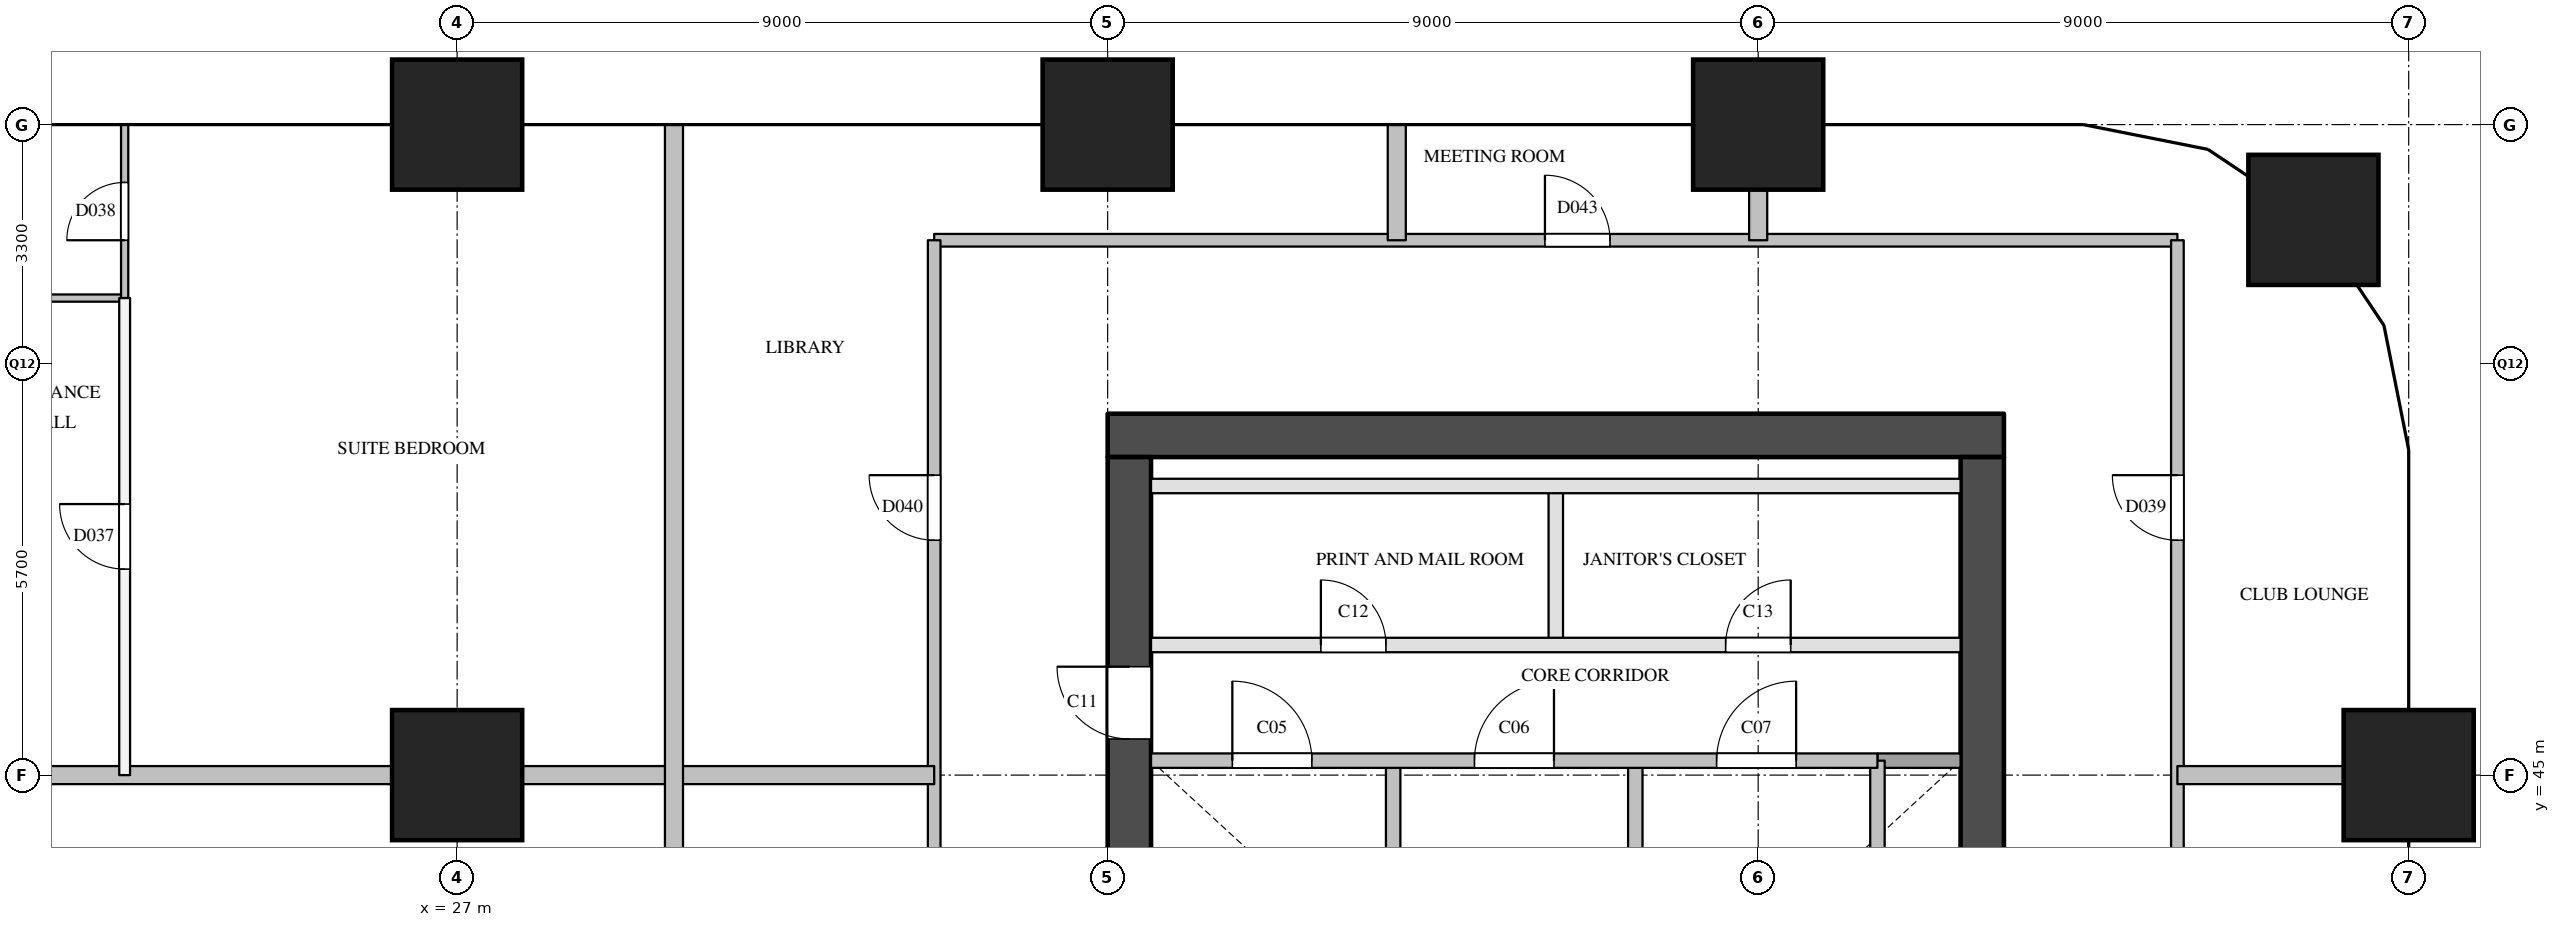
"""IFC4 building model, lengths in metres.
Left out: names, types, materials, properties, quantities, classifications, styles, units other than length and angle.
Written with IfcOpenShell. Run it as: python <this file> out.ifc"""

import sys

from ifc_helpers import new_model, si_unit, direction, frame, frame_2d, origin, origin_2d, place, context, subcontext, project, spatial, rectangle, extrude, element, fill, save


model = new_model("IFC4")
c1 = context("Model", 3, precision=1e-05, world=origin(), true_north=direction((0.0, 1.0)))
c2 = subcontext(c1, "Body", "Model", "MODEL_VIEW")
j1 = project(units=[si_unit("LENGTHUNIT", "METRE"), si_unit("PLANEANGLEUNIT", "RADIAN")], contexts=[c1])
p1 = place(None, origin())
s1 = spatial("IfcSite", under=j1, at=p1, CompositionType="ELEMENT")
p2 = place(p1, origin())
s2 = spatial("IfcBuilding", under=s1, at=p2, CompositionType="ELEMENT")
p3 = place(p2, frame((0.0, 0.0, 50.0)))
s3 = spatial("IfcBuildingStorey", under=s2, at=p3, CompositionType="ELEMENT", Elevation=50.0)
for number, where, z_axis, x_axis in (
    (1, (27.0, 45.0, 0.0), (0.0, 0.0, 1.0), (1.0, 0.0, 0.0)),
    (2, (27.0, 54.0, 0.0), (0.0, 0.0, 1.0), (1.0, 0.0, 0.0)),
    (3, (36.0, 54.0, 0.0), (0.0, 0.0, 1.0), (1.0, 0.0, 0.0)),
    (4, (45.0, 54.0, 0.0), (0.0, 0.0, 1.0), (1.0, 0.0, 0.0)),
    (5, (54.0, 45.0, 0.0), (0.0, 0.0, 1.0), (1.0, 0.0, 0.0)),
    (6, (52.682, 52.682, 0.0), (0.0, 0.0, 1.0), (1.0, 0.0, 0.0)),
):
    element("IfcColumn", number, at=place(p3, frame(where, z_axis=z_axis, x_axis=x_axis)), inside=s3, PredefinedType="COLUMN", context=c2, shape_type="SweptSolid", body=[
        extrude(rectangle(XDim=1.8, YDim=1.8, at=origin_2d()), origin(), (0.0, 0.0, 1.0), 3.8),
    ])
p4 = place(p3, frame((36.0, 49.7, 0.0), z_axis=(0.0, 0.0, 1.0), x_axis=(1.0, 0.0, 0.0)))
e7 = element("IfcWall", 7, at=p4, inside=s3, PredefinedType="SHEAR", context=c2, shape_type="SweptSolid", body=[
    extrude(rectangle(XDim=12.4, YDim=0.6, at=frame_2d((6.2, 0.0))), origin(), (0.0, 0.0, 1.0), 3.5),
])
p5 = place(p3, frame((36.3, 29.1, 0.0), z_axis=(0.0, 0.0, 1.0), x_axis=(0.0, 1.0, 0.0)))
e8 = element("IfcWall", 8, at=p5, inside=s3, PredefinedType="SHEAR", context=c2, shape_type="SweptSolid", body=[
    extrude(rectangle(XDim=20.3, YDim=0.6, at=frame_2d((10.15, 0.0))), origin(), (0.0, 0.0, 1.0), 3.5),
])
p6 = place(p5, frame((3.6, 0.0, 0.0)))
e9 = element("IfcOpeningElement", 9, at=p6, cuts=e8, PredefinedType="OPENING", context=c2, shape_type="SweptSolid", body=[
    extrude(rectangle(XDim=1.8, YDim=2.1, at=frame_2d((0.9, 1.05))), frame((0.0, 0.31, 0.0), z_axis=(0.0, -1.0, 0.0), x_axis=(1.0, 0.0, 0.0)), (0.0, 0.0, 1.0), 0.62),
])
p7 = place(p5, frame((16.4, 0.0, 0.0)))
e10 = element("IfcOpeningElement", 10, at=p7, cuts=e8, PredefinedType="OPENING", context=c2, shape_type="SweptSolid", body=[
    extrude(rectangle(XDim=1.0, YDim=2.1, at=frame_2d((0.5, 1.05))), frame((0.0, 0.31, 0.0), z_axis=(0.0, -1.0, 0.0), x_axis=(1.0, 0.0, 0.0)), (0.0, 0.0, 1.0), 0.62),
])
p8 = place(p3, frame((48.1, 29.1, 0.0), z_axis=(0.0, 0.0, 1.0), x_axis=(0.0, 1.0, 0.0)))
e11 = element("IfcWall", 11, at=p8, inside=s3, PredefinedType="SHEAR", context=c2, shape_type="SweptSolid", body=[
    extrude(rectangle(XDim=20.3, YDim=0.6, at=frame_2d((10.15, 0.0))), origin(), (0.0, 0.0, 1.0), 3.5),
])
p9 = place(p8, frame((12.5, 0.0, 0.0)))
e12 = element("IfcOpeningElement", 12, at=p9, cuts=e11, PredefinedType="OPENING", context=c2, shape_type="SweptSolid", body=[
    extrude(rectangle(XDim=0.7, YDim=2.1, at=frame_2d((0.35, 1.05))), frame((0.0, 0.31, 0.0), z_axis=(0.0, -1.0, 0.0), x_axis=(1.0, 0.0, 0.0)), (0.0, 0.0, 1.0), 0.62),
])
p10 = place(p8, frame((3.9, 0.0, 0.0)))
e13 = element("IfcOpeningElement", 13, at=p10, cuts=e11, PredefinedType="OPENING", context=c2, shape_type="SweptSolid", body=[
    extrude(rectangle(XDim=1.8, YDim=2.1, at=frame_2d((0.9, 1.05))), frame((0.0, 0.31, 0.0), z_axis=(0.0, -1.0, 0.0), x_axis=(1.0, 0.0, 0.0)), (0.0, 0.0, 1.0), 0.62),
])
p11 = place(p3, frame((39.95, 40.78, 0.0), z_axis=(0.0, 0.0, 1.0), x_axis=(0.0, 1.0, 0.0)))
e14 = element("IfcWall", 14, at=p11, inside=s3, PredefinedType="SOLIDWALL", context=c2, shape_type="SweptSolid", body=[
    extrude(rectangle(XDim=4.42, YDim=0.2, at=frame_2d((2.21, 0.0))), origin(), (0.0, 0.0, 1.0), 3.5),
])
p12 = place(p3, frame((42.2, 46.8, 0.0), z_axis=(0.0, 0.0, 1.0), x_axis=(0.0, 1.0, 0.0)))
e15 = element("IfcWall", 15, at=p12, inside=s3, PredefinedType="PARTITIONING", context=c2, shape_type="SweptSolid", body=[
    extrude(rectangle(XDim=2.2, YDim=0.2, at=frame_2d((1.1, 0.0))), origin(), (0.0, 0.0, 1.0), 3.5),
])
for number, where, z_axis, x_axis in (
    (16, (43.3, 40.78, 0.0), (0.0, 0.0, 1.0), (0.0, 1.0, 0.0)),
    (17, (46.65, 40.78, 0.0), (0.0, 0.0, 1.0), (0.0, 1.0, 0.0)),
):
    element("IfcWall", number, at=place(p3, frame(where, z_axis=z_axis, x_axis=x_axis)), inside=s3, PredefinedType="SOLIDWALL", context=c2, shape_type="SweptSolid", body=[
        extrude(rectangle(XDim=4.42, YDim=0.2, at=frame_2d((2.21, 0.0))), origin(), (0.0, 0.0, 1.0), 3.5),
    ])
p13 = place(p3, frame((46.65, 45.2, 0.0), z_axis=(0.0, 0.0, 1.0), x_axis=(1.0, 0.0, 0.0)))
e18 = element("IfcWall", 18, at=p13, inside=s3, PredefinedType="SOLIDWALL", context=c2, shape_type="SweptSolid", body=[
    extrude(rectangle(XDim=1.15, YDim=0.2, at=frame_2d((0.575, 0.0))), origin(), (0.0, 0.0, 1.0), 3.5),
])
p14 = place(p3, frame((36.6, 45.2, 0.0), z_axis=(0.0, 0.0, 1.0), x_axis=(1.0, 0.0, 0.0)))
e19 = element("IfcWall", 19, at=p14, inside=s3, PredefinedType="SOLIDWALL", context=c2, shape_type="SweptSolid", body=[
    extrude(rectangle(XDim=10.05, YDim=0.2, at=frame_2d((5.025, 0.0))), origin(), (0.0, 0.0, 1.0), 3.5),
])
p15 = place(p14, frame((1.125, 0.0, 0.0)))
e20 = element("IfcOpeningElement", 20, at=p15, cuts=e19, PredefinedType="OPENING", context=c2, shape_type="SweptSolid", body=[
    extrude(rectangle(XDim=1.1, YDim=2.1, at=frame_2d((0.55, 1.05))), frame((0.0, 0.11, 0.0), z_axis=(0.0, -1.0, 0.0), x_axis=(1.0, 0.0, 0.0)), (0.0, 0.0, 1.0), 0.22),
])
p16 = place(p14, frame((4.475, 0.0, 0.0)))
e21 = element("IfcOpeningElement", 21, at=p16, cuts=e19, PredefinedType="OPENING", context=c2, shape_type="SweptSolid", body=[
    extrude(rectangle(XDim=1.1, YDim=2.1, at=frame_2d((0.55, 1.05))), frame((0.0, 0.11, 0.0), z_axis=(0.0, -1.0, 0.0), x_axis=(1.0, 0.0, 0.0)), (0.0, 0.0, 1.0), 0.22),
])
p17 = place(p14, frame((7.825, 0.0, 0.0)))
e22 = element("IfcOpeningElement", 22, at=p17, cuts=e19, PredefinedType="OPENING", context=c2, shape_type="SweptSolid", body=[
    extrude(rectangle(XDim=1.1, YDim=2.1, at=frame_2d((0.55, 1.05))), frame((0.0, 0.11, 0.0), z_axis=(0.0, -1.0, 0.0), x_axis=(1.0, 0.0, 0.0)), (0.0, 0.0, 1.0), 0.22),
])
p18 = place(p3, frame((36.6, 46.8, 0.0), z_axis=(0.0, 0.0, 1.0), x_axis=(1.0, 0.0, 0.0)))
e23 = element("IfcWall", 23, at=p18, inside=s3, PredefinedType="PARTITIONING", context=c2, shape_type="SweptSolid", body=[
    extrude(rectangle(XDim=11.2, YDim=0.2, at=frame_2d((5.6, 0.0))), origin(), (0.0, 0.0, 1.0), 3.5),
])
p19 = place(p18, frame((2.35, 0.0, 0.0)))
e24 = element("IfcOpeningElement", 24, at=p19, cuts=e23, PredefinedType="OPENING", context=c2, shape_type="SweptSolid", body=[
    extrude(rectangle(XDim=0.9, YDim=2.1, at=frame_2d((0.45, 1.05))), frame((0.0, 0.11, 0.0), z_axis=(0.0, -1.0, 0.0), x_axis=(1.0, 0.0, 0.0)), (0.0, 0.0, 1.0), 0.22),
])
p20 = place(p18, frame((7.95, 0.0, 0.0)))
e25 = element("IfcOpeningElement", 25, at=p20, cuts=e23, PredefinedType="OPENING", context=c2, shape_type="SweptSolid", body=[
    extrude(rectangle(XDim=0.9, YDim=2.1, at=frame_2d((0.45, 1.05))), frame((0.0, 0.11, 0.0), z_axis=(0.0, -1.0, 0.0), x_axis=(1.0, 0.0, 0.0)), (0.0, 0.0, 1.0), 0.22),
])
p21 = place(p3, frame((36.6, 49.0, 0.0), z_axis=(0.0, 0.0, 1.0), x_axis=(1.0, 0.0, 0.0)))
e26 = element("IfcWall", 26, at=p21, inside=s3, PredefinedType="PARTITIONING", context=c2, shape_type="SweptSolid", body=[
    extrude(rectangle(XDim=11.2, YDim=0.2, at=frame_2d((5.6, 0.0))), origin(), (0.0, 0.0, 1.0), 3.5),
])
p22 = place(p3, frame((33.6, 52.4, 0.0), z_axis=(0.0, 0.0, 1.0), x_axis=(1.0, 0.0, 0.0)))
e27 = element("IfcWall", 27, at=p22, inside=s3, PredefinedType="PARTITIONING", context=c2, shape_type="SweptSolid", body=[
    extrude(rectangle(XDim=17.2, YDim=0.175, at=frame_2d((8.6, 0.0))), origin(), (0.0, 0.0, 1.0), 3.5),
])
p23 = place(p22, frame((8.45, 0.0, 0.0)))
e28 = element("IfcOpeningElement", 28, at=p23, cuts=e27, PredefinedType="OPENING", context=c2, shape_type="SweptSolid", body=[
    extrude(rectangle(XDim=0.9, YDim=2.1, at=frame_2d((0.45, 1.05))), frame((0.0, 0.097, 0.0), z_axis=(0.0, -1.0, 0.0), x_axis=(1.0, 0.0, 0.0)), (0.0, 0.0, 1.0), 0.195),
])
p24 = place(p3, frame((33.6, 41.2, 0.0), z_axis=(0.0, 0.0, 1.0), x_axis=(0.0, 1.0, 0.0)))
e29 = element("IfcWall", 29, at=p24, inside=s3, PredefinedType="PARTITIONING", context=c2, shape_type="SweptSolid", body=[
    extrude(rectangle(XDim=11.2, YDim=0.175, at=frame_2d((5.6, 0.0))), origin(), (0.0, 0.0, 1.0), 3.5),
])
p25 = place(p24, frame((1.4, 0.0, 0.0)))
e30 = element("IfcOpeningElement", 30, at=p25, cuts=e29, PredefinedType="OPENING", context=c2, shape_type="SweptSolid", body=[
    extrude(rectangle(XDim=1.0, YDim=2.1, at=frame_2d((0.5, 1.05))), frame((0.0, 0.097, 0.0), z_axis=(0.0, -1.0, 0.0), x_axis=(1.0, 0.0, 0.0)), (0.0, 0.0, 1.0), 0.195),
])
p26 = place(p24, frame((7.05, 0.0, 0.0)))
e31 = element("IfcOpeningElement", 31, at=p26, cuts=e29, PredefinedType="OPENING", context=c2, shape_type="SweptSolid", body=[
    extrude(rectangle(XDim=0.9, YDim=2.1, at=frame_2d((0.45, 1.05))), frame((0.0, 0.097, 0.0), z_axis=(0.0, -1.0, 0.0), x_axis=(1.0, 0.0, 0.0)), (0.0, 0.0, 1.0), 0.195),
])
p27 = place(p3, frame((50.8, 26.1, 0.0), z_axis=(0.0, 0.0, 1.0), x_axis=(0.0, 1.0, 0.0)))
e32 = element("IfcWall", 32, at=p27, inside=s3, PredefinedType="PARTITIONING", context=c2, shape_type="SweptSolid", body=[
    extrude(rectangle(XDim=26.3, YDim=0.175, at=frame_2d((13.15, 0.0))), origin(), (0.0, 0.0, 1.0), 2.5),
])
p28 = place(p27, frame((5.95, 0.0, 0.0)))
e33 = element("IfcOpeningElement", 33, at=p28, cuts=e32, PredefinedType="OPENING", context=c2, shape_type="SweptSolid", body=[
    extrude(rectangle(XDim=0.9, YDim=2.1, at=frame_2d((0.45, 1.05))), frame((0.0, 0.097, 0.0), z_axis=(0.0, -1.0, 0.0), x_axis=(1.0, 0.0, 0.0)), (0.0, 0.0, 1.0), 0.195),
])
p29 = place(p27, frame((13.4, 0.0, 0.0)))
e34 = element("IfcOpeningElement", 34, at=p29, cuts=e32, PredefinedType="OPENING", context=c2, shape_type="SweptSolid", body=[
    extrude(rectangle(XDim=1.0, YDim=2.1, at=frame_2d((0.5, 1.05))), frame((0.0, 0.097, 0.0), z_axis=(0.0, -1.0, 0.0), x_axis=(1.0, 0.0, 0.0)), (0.0, 0.0, 1.0), 0.195),
])
p30 = place(p27, frame((22.15, 0.0, 0.0)))
e35 = element("IfcOpeningElement", 35, at=p30, cuts=e32, PredefinedType="OPENING", context=c2, shape_type="SweptSolid", body=[
    extrude(rectangle(XDim=0.9, YDim=2.1, at=frame_2d((0.45, 1.05))), frame((0.0, 0.097, 0.0), z_axis=(0.0, -1.0, 0.0), x_axis=(1.0, 0.0, 0.0)), (0.0, 0.0, 1.0), 0.195),
])
p31 = place(p3, frame((22.4, 45.0, 0.0), z_axis=(0.0, 0.0, 1.0), x_axis=(0.0, 1.0, 0.0)))
e36 = element("IfcWall", 36, at=p31, inside=s3, PredefinedType="PARTITIONING", context=c2, shape_type="SweptSolid", body=[
    extrude(rectangle(XDim=6.6, YDim=0.15, at=frame_2d((3.3, 0.0))), origin(), (0.0, 0.0, 1.0), 3.5),
])
p32 = place(p31, frame((2.85, 0.0, 0.0)))
e37 = element("IfcOpeningElement", 37, at=p32, cuts=e36, PredefinedType="OPENING", context=c2, shape_type="SweptSolid", body=[
    extrude(rectangle(XDim=0.9, YDim=2.1, at=frame_2d((0.45, 1.05))), frame((0.0, 0.085, 0.0), z_axis=(0.0, -1.0, 0.0), x_axis=(1.0, 0.0, 0.0)), (0.0, 0.0, 1.0), 0.17),
])
p33 = place(p3, frame((20.4, 45.0, 0.0), z_axis=(0.0, 0.0, 1.0), x_axis=(1.0, 0.0, 0.0)))
e38 = element("IfcWall", 38, at=p33, inside=s3, PredefinedType="PARTITIONING", context=c2, shape_type="SweptSolid", body=[
    extrude(rectangle(XDim=13.2, YDim=0.25, at=frame_2d((6.6, 0.0))), origin(), (0.0, 0.0, 1.0), 3.5),
])
p34 = place(p3, frame((50.8, 45.0, 0.0), z_axis=(0.0, 0.0, 1.0), x_axis=(1.0, 0.0, 0.0)))
e39 = element("IfcWall", 39, at=p34, inside=s3, PredefinedType="PARTITIONING", context=c2, shape_type="SweptSolid", body=[
    extrude(rectangle(XDim=3.2, YDim=0.25, at=frame_2d((1.6, 0.0))), origin(), (0.0, 0.0, 1.0), 3.5),
])
p35 = place(p3, frame((30.0, 41.2, 0.0), z_axis=(0.0, 0.0, 1.0), x_axis=(0.0, 1.0, 0.0)))
e40 = element("IfcWall", 40, at=p35, inside=s3, PredefinedType="PARTITIONING", context=c2, shape_type="SweptSolid", body=[
    extrude(rectangle(XDim=12.8, YDim=0.25, at=frame_2d((6.4, 0.0))), origin(), (0.0, 0.0, 1.0), 2.5),
])
p36 = place(p3, frame((40.0, 52.4, 0.0), z_axis=(0.0, 0.0, 1.0), x_axis=(0.0, 1.0, 0.0)))
e41 = element("IfcWall", 41, at=p36, inside=s3, PredefinedType="PARTITIONING", context=c2, shape_type="SweptSolid", body=[
    extrude(rectangle(XDim=1.6, YDim=0.25, at=frame_2d((0.8, 0.0))), origin(), (0.0, 0.0, 1.0), 2.5),
])
p37 = place(p3, frame((45.0, 52.4, 0.0), z_axis=(0.0, 0.0, 1.0), x_axis=(0.0, 1.0, 0.0)))
e42 = element("IfcWall", 42, at=p37, inside=s3, PredefinedType="PARTITIONING", context=c2, shape_type="SweptSolid", body=[
    extrude(rectangle(XDim=1.6, YDim=0.25, at=frame_2d((0.8, 0.0))), origin(), (0.0, 0.0, 1.0), 3.5),
])
p38 = place(p3, frame((20.4, 51.6, 0.0), z_axis=(0.0, 0.0, 1.0), x_axis=(1.0, 0.0, 0.0)))
e43 = element("IfcWall", 43, at=p38, inside=s3, PredefinedType="PARTITIONING", context=c2, shape_type="SweptSolid", body=[
    extrude(rectangle(XDim=2.0, YDim=0.1, at=frame_2d((1.0, 0.0))), origin(), (0.0, 0.0, 1.0), 3.5),
])
p39 = place(p3, frame((22.4, 51.6, 0.0), z_axis=(0.0, 0.0, 1.0), x_axis=(0.0, 1.0, 0.0)))
e44 = element("IfcWall", 44, at=p39, inside=s3, PredefinedType="PARTITIONING", context=c2, shape_type="SweptSolid", body=[
    extrude(rectangle(XDim=2.4, YDim=0.1, at=frame_2d((1.2, 0.0))), origin(), (0.0, 0.0, 1.0), 2.5),
])
p40 = place(p39, frame((0.8, 0.0, 0.0)))
e45 = element("IfcOpeningElement", 45, at=p40, cuts=e44, PredefinedType="OPENING", context=c2, shape_type="SweptSolid", body=[
    extrude(rectangle(XDim=0.8, YDim=2.1, at=frame_2d((0.4, 1.05))), frame((0.0, 0.06, 0.0), z_axis=(0.0, -1.0, 0.0), x_axis=(1.0, 0.0, 0.0)), (0.0, 0.0, 1.0), 0.12),
])
p41 = place(p15, origin())
e46 = element("IfcDoor", 46, at=p41, inside=s3, OperationType="SINGLE_SWING_LEFT", PredefinedType="DOOR", context=c2, shape_type="SweptSolid", body=[
    extrude(rectangle(XDim=1.1, YDim=2.1, at=frame_2d((0.55, 1.05))), frame((0.0, 0.025, 0.0), z_axis=(0.0, -1.0, 0.0), x_axis=(1.0, 0.0, 0.0)), (0.0, 0.0, 1.0), 0.05),
])
fill(e20, e46)
p42 = place(p16, origin())
e47 = element("IfcDoor", 47, at=p42, inside=s3, OperationType="SINGLE_SWING_RIGHT", PredefinedType="DOOR", context=c2, shape_type="SweptSolid", body=[
    extrude(rectangle(XDim=1.1, YDim=2.1, at=frame_2d((0.55, 1.05))), frame((0.0, 0.025, 0.0), z_axis=(0.0, -1.0, 0.0), x_axis=(1.0, 0.0, 0.0)), (0.0, 0.0, 1.0), 0.05),
])
fill(e21, e47)
p43 = place(p17, origin())
e48 = element("IfcDoor", 48, at=p43, inside=s3, OperationType="SINGLE_SWING_RIGHT", PredefinedType="DOOR", context=c2, shape_type="SweptSolid", body=[
    extrude(rectangle(XDim=1.1, YDim=2.1, at=frame_2d((0.55, 1.05))), frame((0.0, 0.025, 0.0), z_axis=(0.0, -1.0, 0.0), x_axis=(1.0, 0.0, 0.0)), (0.0, 0.0, 1.0), 0.05),
])
fill(e22, e48)
p44 = place(p7, origin())
e49 = element("IfcDoor", 49, at=p44, inside=s3, OperationType="SINGLE_SWING_RIGHT", PredefinedType="DOOR", context=c2, shape_type="SweptSolid", body=[
    extrude(rectangle(XDim=1.0, YDim=2.1, at=frame_2d((0.5, 1.05))), frame((0.0, 0.025, 0.0), z_axis=(0.0, -1.0, 0.0), x_axis=(1.0, 0.0, 0.0)), (0.0, 0.0, 1.0), 0.05),
])
fill(e10, e49)
p45 = place(p19, origin())
e50 = element("IfcDoor", 50, at=p45, inside=s3, OperationType="SINGLE_SWING_LEFT", PredefinedType="DOOR", context=c2, shape_type="SweptSolid", body=[
    extrude(rectangle(XDim=0.9, YDim=2.1, at=frame_2d((0.45, 1.05))), frame((0.0, 0.025, 0.0), z_axis=(0.0, -1.0, 0.0), x_axis=(1.0, 0.0, 0.0)), (0.0, 0.0, 1.0), 0.05),
])
fill(e24, e50)
p46 = place(p20, origin())
e51 = element("IfcDoor", 51, at=p46, inside=s3, OperationType="SINGLE_SWING_RIGHT", PredefinedType="DOOR", context=c2, shape_type="SweptSolid", body=[
    extrude(rectangle(XDim=0.9, YDim=2.1, at=frame_2d((0.45, 1.05))), frame((0.0, 0.025, 0.0), z_axis=(0.0, -1.0, 0.0), x_axis=(1.0, 0.0, 0.0)), (0.0, 0.0, 1.0), 0.05),
])
fill(e25, e51)
p47 = place(p32, origin())
e52 = element("IfcDoor", 52, at=p47, inside=s3, OperationType="SINGLE_SWING_RIGHT", PredefinedType="DOOR", context=c2, shape_type="SweptSolid", body=[
    extrude(rectangle(XDim=0.9, YDim=2.1, at=frame_2d((0.45, 1.05))), frame((0.0, 0.025, 0.0), z_axis=(0.0, -1.0, 0.0), x_axis=(1.0, 0.0, 0.0)), (0.0, 0.0, 1.0), 0.05),
])
fill(e37, e52)
p48 = place(p40, origin())
e53 = element("IfcDoor", 53, at=p48, inside=s3, OperationType="SINGLE_SWING_LEFT", PredefinedType="DOOR", context=c2, shape_type="SweptSolid", body=[
    extrude(rectangle(XDim=0.8, YDim=2.1, at=frame_2d((0.4, 1.05))), frame((0.0, 0.025, 0.0), z_axis=(0.0, -1.0, 0.0), x_axis=(1.0, 0.0, 0.0)), (0.0, 0.0, 1.0), 0.05),
])
fill(e45, e53)
p49 = place(p30, origin())
e54 = element("IfcDoor", 54, at=p49, inside=s3, OperationType="SINGLE_SWING_RIGHT", PredefinedType="DOOR", context=c2, shape_type="SweptSolid", body=[
    extrude(rectangle(XDim=0.9, YDim=2.1, at=frame_2d((0.45, 1.05))), frame((0.0, 0.025, 0.0), z_axis=(0.0, -1.0, 0.0), x_axis=(1.0, 0.0, 0.0)), (0.0, 0.0, 1.0), 0.05),
])
fill(e35, e54)
p50 = place(p26, origin())
e55 = element("IfcDoor", 55, at=p50, inside=s3, OperationType="SINGLE_SWING_RIGHT", PredefinedType="DOOR", context=c2, shape_type="SweptSolid", body=[
    extrude(rectangle(XDim=0.9, YDim=2.1, at=frame_2d((0.45, 1.05))), frame((0.0, 0.025, 0.0), z_axis=(0.0, -1.0, 0.0), x_axis=(1.0, 0.0, 0.0)), (0.0, 0.0, 1.0), 0.05),
])
fill(e31, e55)
p51 = place(p23, origin())
e56 = element("IfcDoor", 56, at=p51, inside=s3, OperationType="SINGLE_SWING_LEFT", PredefinedType="DOOR", context=c2, shape_type="SweptSolid", body=[
    extrude(rectangle(XDim=0.9, YDim=2.1, at=frame_2d((0.45, 1.05))), frame((0.0, 0.025, 0.0), z_axis=(0.0, -1.0, 0.0), x_axis=(1.0, 0.0, 0.0)), (0.0, 0.0, 1.0), 0.05),
])
fill(e28, e56)
save(model, sys.argv[1])
